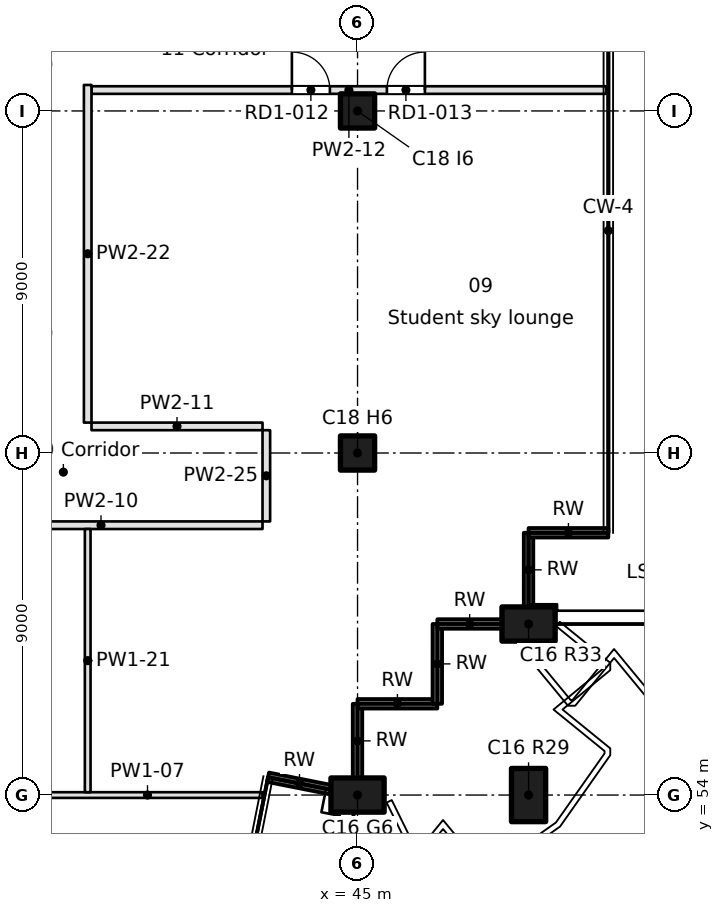
"""IFC4 building model, lengths in metres.
Left out: names, types, materials, properties, quantities, classifications, styles, units other than length and angle.
Written with IfcOpenShell. Run it as: python <this file> out.ifc"""

import sys

from ifc_helpers import new_model, si_unit, direction, frame, frame_2d, origin, origin_2d, place, context, subcontext, project, spatial, rectangle, extrude, element, fill, save


model = new_model("IFC4")
c1 = context("Model", 3, precision=1e-05, world=origin(), true_north=direction((0.0, 1.0)))
c2 = subcontext(c1, "Body", "Model", "MODEL_VIEW")
j1 = project(units=[si_unit("LENGTHUNIT", "METRE"), si_unit("PLANEANGLEUNIT", "RADIAN")], contexts=[c1])
p1 = place(None, origin())
s1 = spatial("IfcSite", under=j1, at=p1, CompositionType="ELEMENT")
p2 = place(p1, origin())
s2 = spatial("IfcBuilding", under=s1, at=p2, CompositionType="ELEMENT")
p3 = place(p2, frame((0.0, 0.0, 299.3)))
s3 = spatial("IfcBuildingStorey", under=s2, at=p3, CompositionType="ELEMENT", Elevation=299.3)
for number, where, z_axis, x_axis in (
    (1, (45.0, 54.0, 0.0), (0.0, 0.0, 1.0), (1.0, 0.0, 0.0)),
    (2, (49.5, 54.0, 0.0), (0.0, 0.0, 1.0), (0.0, 1.0, 0.0)),
    (3, (49.5, 58.5, 0.0), (0.0, 0.0, 1.0), (1.0, 0.0, 0.0)),
):
    element("IfcColumn", number, at=place(p3, frame(where, z_axis=z_axis, x_axis=x_axis)), inside=s3, PredefinedType="COLUMN", context=c2, shape_type="SweptSolid", body=[
        extrude(rectangle(XDim=1.4, YDim=0.9, at=origin_2d()), origin(), (0.0, 0.0, 1.0), 3.45),
    ])
for number, where, z_axis, x_axis in (
    (4, (45.0, 63.0, 0.0), (0.0, 0.0, 1.0), (1.0, 0.0, 0.0)),
    (5, (45.0, 72.0, 0.0), (0.0, 0.0, 1.0), (1.0, 0.0, 0.0)),
):
    element("IfcColumn", number, at=place(p3, frame(where, z_axis=z_axis, x_axis=x_axis)), inside=s3, PredefinedType="COLUMN", context=c2, shape_type="SweptSolid", body=[
        extrude(rectangle(XDim=0.9, YDim=0.9, at=origin_2d()), origin(), (0.0, 0.0, 1.0), 3.7),
    ])
p4 = place(p3, frame((42.645, 54.469, 0.0), z_axis=(0.0, 0.0, 1.0), x_axis=(0.980846923473, -0.194780165092, 0.0)))
e6 = element("IfcWall", 6, at=p4, inside=s3, PredefinedType="SOLIDWALL", context=c2, shape_type="SweptSolid", body=[
    extrude(rectangle(XDim=1.687, YDim=0.25, at=frame_2d((0.844, 0.0))), origin(), (0.0, 0.0, 1.0), 3.25),
])
p5 = place(p3, frame((44.999, 54.45, 0.0), z_axis=(0.0, 0.0, 1.0), x_axis=(0.000125156445, 0.999999992168, 0.0)))
e7 = element("IfcWall", 7, at=p5, inside=s3, PredefinedType="SOLIDWALL", context=c2, shape_type="SweptSolid", body=[
    extrude(rectangle(XDim=1.951, YDim=0.25, at=frame_2d((0.975, 0.0))), origin(), (0.0, 0.0, 1.0), 3.25),
])
p6 = place(p3, frame((44.999, 56.401, 0.0), z_axis=(0.0, 0.0, 1.0), x_axis=(0.999999993241, 0.00011626555, 0.0)))
e8 = element("IfcWall", 8, at=p6, inside=s3, PredefinedType="SOLIDWALL", context=c2, shape_type="SweptSolid", body=[
    extrude(rectangle(XDim=2.1, YDim=0.25, at=frame_2d((1.05, 0.0))), origin(), (0.0, 0.0, 1.0), 3.25),
])
p7 = place(p3, frame((47.099, 56.401, 0.0), z_axis=(0.0, 0.0, 1.0), x_axis=(0.000232504063, 0.999999972971, 0.0)))
e9 = element("IfcWall", 9, at=p7, inside=s3, PredefinedType="SOLIDWALL", context=c2, shape_type="SweptSolid", body=[
    extrude(rectangle(XDim=2.1, YDim=0.25, at=frame_2d((1.05, 0.0))), origin(), (0.0, 0.0, 1.0), 3.25),
])
p8 = place(p3, frame((47.1, 58.501, 0.0), z_axis=(0.0, 0.0, 1.0), x_axis=(1.0, 0.0, 0.0)))
e10 = element("IfcWall", 10, at=p8, inside=s3, PredefinedType="SOLIDWALL", context=c2, shape_type="SweptSolid", body=[
    extrude(rectangle(XDim=1.7, YDim=0.25, at=frame_2d((0.85, 0.0))), origin(), (0.0, 0.0, 1.0), 3.25),
])
p9 = place(p3, frame((49.499, 58.95, 0.0), z_axis=(0.0, 0.0, 1.0), x_axis=(0.000250281559, 0.99999996868, 0.0)))
e11 = element("IfcWall", 11, at=p9, inside=s3, PredefinedType="SOLIDWALL", context=c2, shape_type="SweptSolid", body=[
    extrude(rectangle(XDim=1.951, YDim=0.25, at=frame_2d((0.976, 0.0))), origin(), (0.0, 0.0, 1.0), 3.25),
])
p10 = place(p3, frame((49.5, 60.901, 0.0), z_axis=(0.0, 0.0, 1.0), x_axis=(1.0, 0.0, 0.0)))
e12 = element("IfcWall", 12, at=p10, inside=s3, PredefinedType="SOLIDWALL", context=c2, shape_type="SweptSolid", body=[
    extrude(rectangle(XDim=2.1, YDim=0.25, at=frame_2d((1.05, 0.0))), origin(), (0.0, 0.0, 1.0), 3.25),
])
p11 = place(p3, frame((36.45, 54.0, 0.0), z_axis=(0.0, 0.0, 1.0), x_axis=(1.0, 0.0, 0.0)))
e13 = element("IfcWall", 13, at=p11, inside=s3, PredefinedType="PARTITIONING", context=c2, shape_type="SweptSolid", body=[
    extrude(rectangle(XDim=6.047, YDim=0.15, at=frame_2d((3.023, 0.0))), origin(), (0.0, 0.0, 1.0), 3.25),
])
p12 = place(p3, frame((42.5, 61.1, 0.0), z_axis=(0.0, 0.0, 1.0), x_axis=(-1.0, 0.0, 0.0)))
e14 = element("IfcWall", 14, at=p12, inside=s3, PredefinedType="PARTITIONING", context=c2, shape_type="SweptSolid", body=[
    extrude(rectangle(XDim=8.5, YDim=0.2, at=frame_2d((4.25, 0.0))), origin(), (0.0, 0.0, 1.0), 3.25),
])
p13 = place(p3, frame((38.0, 63.7, 0.0), z_axis=(0.0, 0.0, 1.0), x_axis=(1.0, 0.0, 0.0)))
e15 = element("IfcWall", 15, at=p13, inside=s3, PredefinedType="PARTITIONING", context=c2, shape_type="SweptSolid", body=[
    extrude(rectangle(XDim=4.5, YDim=0.2, at=frame_2d((2.25, 0.0))), origin(), (0.0, 0.0, 1.0), 3.25),
])
p14 = place(p3, frame((51.545, 72.55, 0.0), z_axis=(0.0, 0.0, 1.0), x_axis=(-1.0, 0.0, 0.0)))
e16 = element("IfcWall", 16, at=p14, inside=s3, PredefinedType="PARTITIONING", context=c2, shape_type="SweptSolid", body=[
    extrude(rectangle(XDim=13.545, YDim=0.2, at=frame_2d((6.772, 0.0))), origin(), (0.0, 0.0, 1.0), 3.25),
])
p15 = place(p14, frame((7.272, 0.0, 0.0)))
e17 = element("IfcOpeningElement", 17, at=p15, cuts=e16, PredefinedType="OPENING", context=c2, shape_type="SweptSolid", body=[
    extrude(rectangle(XDim=1.0, YDim=2.1, at=frame_2d((0.5, 1.05))), frame((0.0, 0.1, 0.0), z_axis=(0.0, -1.0, 0.0), x_axis=(1.0, 0.0, 0.0)), (0.0, 0.0, 1.0), 0.2),
])
p16 = place(p14, frame((4.772, 0.0, 0.0)))
e18 = element("IfcOpeningElement", 18, at=p16, cuts=e16, PredefinedType="OPENING", context=c2, shape_type="SweptSolid", body=[
    extrude(rectangle(XDim=1.0, YDim=2.1, at=frame_2d((0.5, 1.05))), frame((0.0, 0.1, 0.0), z_axis=(0.0, -1.0, 0.0), x_axis=(1.0, 0.0, 0.0)), (0.0, 0.0, 1.0), 0.2),
])
p17 = place(p3, frame((37.9, 61.0, 0.0), z_axis=(0.0, 0.0, 1.0), x_axis=(0.0, -1.0, 0.0)))
e19 = element("IfcWall", 19, at=p17, inside=s3, PredefinedType="PARTITIONING", context=c2, shape_type="SweptSolid", body=[
    extrude(rectangle(XDim=6.925, YDim=0.15, at=frame_2d((3.462, 0.0))), origin(), (0.0, 0.0, 1.0), 3.25),
])
p18 = place(p3, frame((37.9, 72.684, 0.0), z_axis=(0.0, 0.0, 1.0), x_axis=(0.0, -1.0, 0.0)))
e20 = element("IfcWall", 20, at=p18, inside=s3, PredefinedType="PARTITIONING", context=c2, shape_type="SweptSolid", body=[
    extrude(rectangle(XDim=8.884, YDim=0.2, at=frame_2d((4.442, 0.0))), origin(), (0.0, 0.0, 1.0), 3.25),
])
p19 = place(p3, frame((42.6, 63.6, 0.0), z_axis=(0.0, 0.0, 1.0), x_axis=(0.0, -1.0, 0.0)))
e21 = element("IfcWall", 21, at=p19, inside=s3, PredefinedType="PARTITIONING", context=c2, shape_type="SweptSolid", body=[
    extrude(rectangle(XDim=2.4, YDim=0.2, at=frame_2d((1.2, 0.0))), origin(), (0.0, 0.0, 1.0), 3.25),
])
p20 = place(p15, frame((1.0, 0.0, 0.0), z_axis=(0.0, 0.0, 1.0), x_axis=(-1.0, 0.0, 0.0)))
e22 = element("IfcDoor", 22, at=p20, inside=s3, OperationType="SINGLE_SWING_LEFT", PredefinedType="DOOR", context=c2, shape_type="SweptSolid", body=[
    extrude(rectangle(XDim=1.0, YDim=2.1, at=frame_2d((0.5, 1.05))), frame((0.0, 0.025, 0.0), z_axis=(0.0, -1.0, 0.0), x_axis=(1.0, 0.0, 0.0)), (0.0, 0.0, 1.0), 0.05),
])
fill(e17, e22)
p21 = place(p16, frame((1.0, 0.0, 0.0), z_axis=(0.0, 0.0, 1.0), x_axis=(-1.0, 0.0, 0.0)))
e23 = element("IfcDoor", 23, at=p21, inside=s3, OperationType="SINGLE_SWING_RIGHT", PredefinedType="DOOR", context=c2, shape_type="SweptSolid", body=[
    extrude(rectangle(XDim=1.0, YDim=2.1, at=frame_2d((0.5, 1.05))), frame((0.0, 0.025, 0.0), z_axis=(0.0, -1.0, 0.0), x_axis=(1.0, 0.0, 0.0)), (0.0, 0.0, 1.0), 0.05),
])
fill(e18, e23)
save(model, sys.argv[1])
